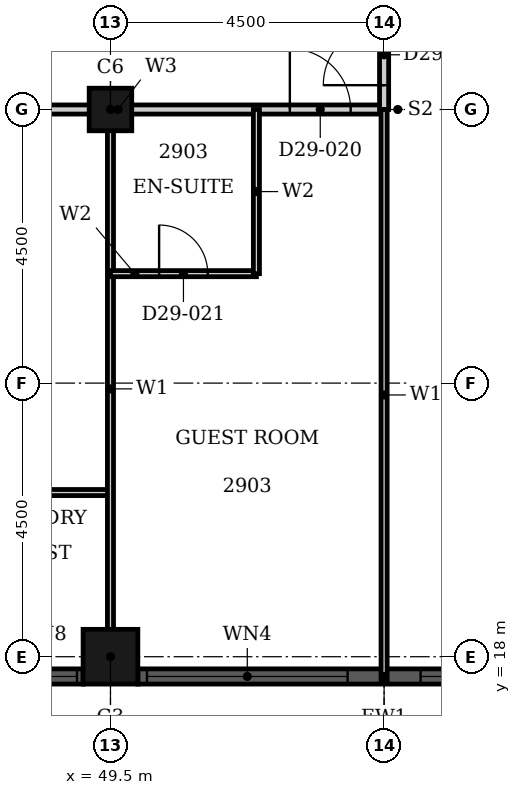
"""IFC4 building model, lengths in metres.
Left out: names, types, materials, properties, quantities, classifications, styles, units other than length and angle.
Written with IfcOpenShell. Run it as: python <this file> out.ifc"""

import sys

from ifc_helpers import new_model, si_unit, direction, frame, frame_2d, origin, origin_2d, place, context, subcontext, project, spatial, rectangle, hollow_rectangle, extrude, element, fill, save


model = new_model("IFC4")
c1 = context("Model", 3, precision=1e-05, world=origin(), true_north=direction((0.0, 1.0)))
c2 = subcontext(c1, "Body", "Model", "MODEL_VIEW")
j1 = project(units=[si_unit("LENGTHUNIT", "METRE"), si_unit("PLANEANGLEUNIT", "RADIAN")], contexts=[c1])
p1 = place(None, origin())
s1 = spatial("IfcSite", under=j1, at=p1, CompositionType="ELEMENT")
p2 = place(p1, origin())
s2 = spatial("IfcBuilding", under=s1, at=p2, CompositionType="ELEMENT")
p3 = place(p2, frame((0.0, 0.0, 118.8)))
s3 = spatial("IfcBuildingStorey", under=s2, at=p3, CompositionType="ELEMENT", Elevation=118.8)
p4 = place(p3, frame((49.5, 18.0, 0.0), z_axis=(0.0, 0.0, 1.0), x_axis=(1.0, 0.0, 0.0)))
e1 = element("IfcColumn", 1, at=p4, inside=s3, PredefinedType="COLUMN", context=c2, shape_type="SweptSolid", body=[
    extrude(hollow_rectangle(XDim=0.9, YDim=0.9, WallThickness=0.028, at=origin_2d()), origin(), (0.0, 0.0, 1.0), 3.6),
])
p5 = place(p3, frame((49.5, 27.0, 0.0), z_axis=(0.0, 0.0, 1.0), x_axis=(1.0, 0.0, 0.0)))
e2 = element("IfcColumn", 2, at=p5, inside=s3, PredefinedType="COLUMN", context=c2, shape_type="SweptSolid", body=[
    extrude(hollow_rectangle(XDim=0.7, YDim=0.7, WallThickness=0.022, at=origin_2d()), origin(), (0.0, 0.0, 1.0), 3.6),
])
p6 = place(p3, frame((47.7, 17.675, 0.0), z_axis=(0.0, 0.0, 1.0), x_axis=(1.0, 0.0, 0.0)))
e3 = element("IfcWall", 3, at=p6, inside=s3, PredefinedType="SOLIDWALL", context=c2, shape_type="SweptSolid", body=[
    extrude(rectangle(XDim=1.35, YDim=0.25, at=frame_2d((0.675, 0.0))), origin(), (0.0, 0.0, 1.0), 3.6),
])
p7 = place(p6, frame((0.1, 0.0, 0.9)))
e4 = element("IfcOpeningElement", 4, at=p7, cuts=e3, PredefinedType="OPENING", context=c2, shape_type="SweptSolid", body=[
    extrude(rectangle(XDim=1.15, YDim=2.08, at=frame_2d((0.575, 1.04))), frame((0.0, 0.135, 0.0), z_axis=(0.0, -1.0, 0.0), x_axis=(1.0, 0.0, 0.0)), (0.0, 0.0, 1.0), 0.27),
])
p8 = place(p3, frame((49.95, 17.675, 0.0), z_axis=(0.0, 0.0, 1.0), x_axis=(1.0, 0.0, 0.0)))
e5 = element("IfcWall", 5, at=p8, inside=s3, PredefinedType="SOLIDWALL", context=c2, shape_type="SweptSolid", body=[
    extrude(rectangle(XDim=8.1, YDim=0.25, at=frame_2d((4.05, 0.0))), origin(), (0.0, 0.0, 1.0), 3.6),
])
p9 = place(p8, frame((0.15, 0.0, 0.9)))
e6 = element("IfcOpeningElement", 6, at=p9, cuts=e5, PredefinedType="OPENING", context=c2, shape_type="SweptSolid", body=[
    extrude(rectangle(XDim=3.3, YDim=2.08, at=frame_2d((1.65, 1.04))), frame((0.0, 0.135, 0.0), z_axis=(0.0, -1.0, 0.0), x_axis=(1.0, 0.0, 0.0)), (0.0, 0.0, 1.0), 0.27),
])
p10 = place(p8, frame((4.65, 0.0, 0.9)))
e7 = element("IfcOpeningElement", 7, at=p10, cuts=e5, PredefinedType="OPENING", context=c2, shape_type="SweptSolid", body=[
    extrude(rectangle(XDim=3.3, YDim=2.08, at=frame_2d((1.65, 1.04))), frame((0.0, 0.135, 0.0), z_axis=(0.0, -1.0, 0.0), x_axis=(1.0, 0.0, 0.0)), (0.0, 0.0, 1.0), 0.27),
])
p11 = place(p3, frame((46.8, 27.0, 0.0), z_axis=(0.0, 0.0, 1.0), x_axis=(1.0, 0.0, 0.0)))
e8 = element("IfcWall", 8, at=p11, inside=s3, PredefinedType="PARTITIONING", context=c2, shape_type="SweptSolid", body=[
    extrude(rectangle(XDim=7.2, YDim=0.15, at=frame_2d((3.6, 0.0))), origin(), (0.0, 0.0, 1.0), 2.58),
])
p12 = place(p11, frame((5.65, 0.0, 0.0)))
e9 = element("IfcOpeningElement", 9, at=p12, cuts=e8, PredefinedType="OPENING", context=c2, shape_type="SweptSolid", body=[
    extrude(rectangle(XDim=1.0, YDim=2.1, at=frame_2d((0.5, 1.05))), frame((0.0, 0.085, 0.0), z_axis=(0.0, -1.0, 0.0), x_axis=(1.0, 0.0, 0.0)), (0.0, 0.0, 1.0), 0.17),
])
p13 = place(p3, frame((54.0, 27.0, 0.0), z_axis=(0.0, 0.0, 1.0), x_axis=(0.0, 1.0, 0.0)))
e10 = element("IfcWall", 10, at=p13, inside=s3, PredefinedType="PARTITIONING", context=c2, shape_type="SweptSolid", body=[
    extrude(rectangle(XDim=1.8, YDim=0.15, at=frame_2d((0.9, 0.0))), origin(), (0.0, 0.0, 1.0), 3.3),
])
p14 = place(p13, frame((0.4, 0.0, 0.0)))
e11 = element("IfcOpeningElement", 11, at=p14, cuts=e10, PredefinedType="OPENING", context=c2, shape_type="SweptSolid", body=[
    extrude(rectangle(XDim=1.0, YDim=2.1, at=frame_2d((0.5, 1.05))), frame((0.0, 0.085, 0.0), z_axis=(0.0, -1.0, 0.0), x_axis=(1.0, 0.0, 0.0)), (0.0, 0.0, 1.0), 0.17),
])
p15 = place(p3, frame((46.8, 20.7, 0.0), z_axis=(0.0, 0.0, 1.0), x_axis=(1.0, 0.0, 0.0)))
e12 = element("IfcWall", 12, at=p15, inside=s3, PredefinedType="PARTITIONING", context=c2, shape_type="SweptSolid", body=[
    extrude(rectangle(XDim=2.7, YDim=0.1, at=frame_2d((1.35, 0.0))), origin(), (0.0, 0.0, 1.0), 3.3),
])
p16 = place(p3, frame((49.5, 17.81, 0.0), z_axis=(0.0, 0.0, 1.0), x_axis=(0.0, 1.0, 0.0)))
e13 = element("IfcWall", 13, at=p16, inside=s3, PredefinedType="PARTITIONING", context=c2, shape_type="SweptSolid", body=[
    extrude(rectangle(XDim=9.19, YDim=0.1, at=frame_2d((4.595, 0.0))), origin(), (0.0, 0.0, 1.0), 2.38),
])
p17 = place(p3, frame((54.0, 17.61, 0.0), z_axis=(0.0, 0.0, 1.0), x_axis=(0.0, 1.0, 0.0)))
e14 = element("IfcWall", 14, at=p17, inside=s3, PredefinedType="PARTITIONING", context=c2, shape_type="SweptSolid", body=[
    extrude(rectangle(XDim=9.39, YDim=0.1, at=frame_2d((4.695, 0.0))), origin(), (0.0, 0.0, 1.0), 3.3),
])
p18 = place(p3, frame((49.5, 24.3, 0.0), z_axis=(0.0, 0.0, 1.0), x_axis=(1.0, 0.0, 0.0)))
e15 = element("IfcWall", 15, at=p18, inside=s3, PredefinedType="PARTITIONING", context=c2, shape_type="SweptSolid", body=[
    extrude(rectangle(XDim=2.4, YDim=0.1, at=frame_2d((1.2, 0.0))), origin(), (0.0, 0.0, 1.0), 3.3),
])
p19 = place(p18, frame((0.8, 0.0, 0.0)))
e16 = element("IfcOpeningElement", 16, at=p19, cuts=e15, PredefinedType="OPENING", context=c2, shape_type="SweptSolid", body=[
    extrude(rectangle(XDim=0.8, YDim=2.1, at=frame_2d((0.4, 1.05))), frame((0.0, 0.06, 0.0), z_axis=(0.0, -1.0, 0.0), x_axis=(1.0, 0.0, 0.0)), (0.0, 0.0, 1.0), 0.12),
])
p20 = place(p3, frame((51.9, 24.3, 0.0), z_axis=(0.0, 0.0, 1.0), x_axis=(0.0, 1.0, 0.0)))
e17 = element("IfcWall", 17, at=p20, inside=s3, PredefinedType="PARTITIONING", context=c2, shape_type="SweptSolid", body=[
    extrude(rectangle(XDim=2.7, YDim=0.1, at=frame_2d((1.35, 0.0))), origin(), (0.0, 0.0, 1.0), 3.3),
])
p21 = place(p7, origin())
e18 = element("IfcWindow", 18, at=p21, inside=s3, PartitioningType="SINGLE_PANEL", PredefinedType="WINDOW", context=c2, shape_type="SweptSolid", body=[
    extrude(rectangle(XDim=1.15, YDim=2.08, at=frame_2d((0.575, 1.04))), frame((0.0, 0.03, 0.0), z_axis=(0.0, -1.0, 0.0), x_axis=(1.0, 0.0, 0.0)), (0.0, 0.0, 1.0), 0.06),
])
fill(e4, e18)
p22 = place(p9, origin())
e19 = element("IfcWindow", 19, at=p22, inside=s3, PartitioningType="SINGLE_PANEL", PredefinedType="WINDOW", context=c2, shape_type="SweptSolid", body=[
    extrude(rectangle(XDim=3.3, YDim=2.08, at=frame_2d((1.65, 1.04))), frame((0.0, 0.03, 0.0), z_axis=(0.0, -1.0, 0.0), x_axis=(1.0, 0.0, 0.0)), (0.0, 0.0, 1.0), 0.06),
])
fill(e6, e19)
p23 = place(p10, origin())
e20 = element("IfcWindow", 20, at=p23, inside=s3, PartitioningType="SINGLE_PANEL", PredefinedType="WINDOW", context=c2, shape_type="SweptSolid", body=[
    extrude(rectangle(XDim=3.3, YDim=2.08, at=frame_2d((1.65, 1.04))), frame((0.0, 0.03, 0.0), z_axis=(0.0, -1.0, 0.0), x_axis=(1.0, 0.0, 0.0)), (0.0, 0.0, 1.0), 0.06),
])
fill(e7, e20)
p24 = place(p12, origin())
e21 = element("IfcDoor", 21, at=p24, inside=s3, OperationType="SINGLE_SWING_RIGHT", PredefinedType="DOOR", context=c2, shape_type="SweptSolid", body=[
    extrude(rectangle(XDim=1.0, YDim=2.1, at=frame_2d((0.5, 1.05))), frame((0.0, 0.025, 0.0), z_axis=(0.0, -1.0, 0.0), x_axis=(1.0, 0.0, 0.0)), (0.0, 0.0, 1.0), 0.05),
])
fill(e9, e21)
p25 = place(p19, origin())
e22 = element("IfcDoor", 22, at=p25, inside=s3, OperationType="SINGLE_SWING_RIGHT", PredefinedType="DOOR", context=c2, shape_type="SweptSolid", body=[
    extrude(rectangle(XDim=0.8, YDim=2.1, at=frame_2d((0.4, 1.05))), frame((0.0, 0.025, 0.0), z_axis=(0.0, -1.0, 0.0), x_axis=(1.0, 0.0, 0.0)), (0.0, 0.0, 1.0), 0.05),
])
fill(e16, e22)
p26 = place(p14, origin())
e23 = element("IfcDoor", 23, at=p26, inside=s3, OperationType="SINGLE_SWING_LEFT", PredefinedType="DOOR", context=c2, shape_type="SweptSolid", body=[
    extrude(rectangle(XDim=1.0, YDim=2.1, at=frame_2d((0.5, 1.05))), frame((0.0, 0.025, 0.0), z_axis=(0.0, -1.0, 0.0), x_axis=(1.0, 0.0, 0.0)), (0.0, 0.0, 1.0), 0.05),
])
fill(e11, e23)
save(model, sys.argv[1])
